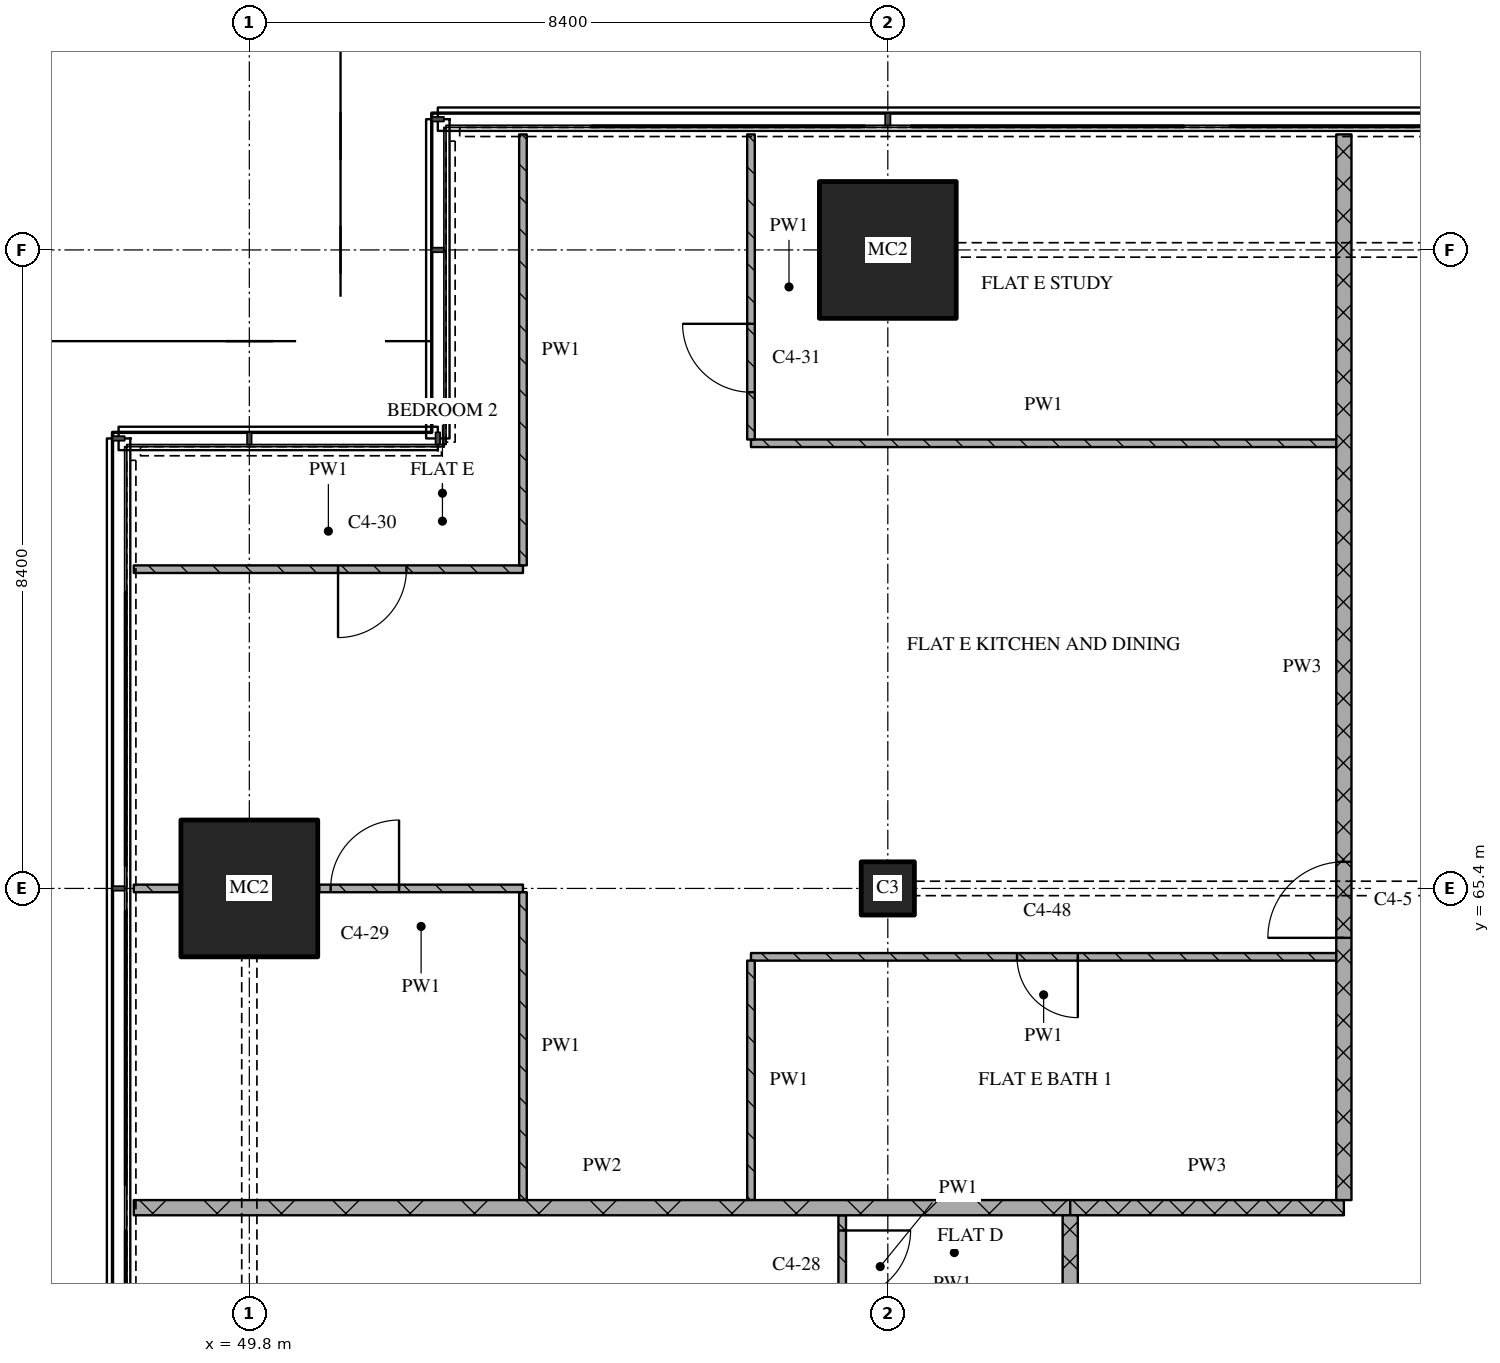
"""IFC4 building model, lengths in metres.
Left out: names, types, materials, properties, quantities, classifications, styles, units other than length and angle.
Written with IfcOpenShell. Run it as: python <this file> out.ifc"""

import sys

from ifc_helpers import new_model, si_unit, direction, frame, frame_2d, origin, origin_2d, place, context, subcontext, project, spatial, rectangle, extrude, element, fill, save


model = new_model("IFC4")
c1 = context("Model", 3, precision=1e-05, world=origin(), true_north=direction((0.0, 1.0)))
c2 = subcontext(c1, "Body", "Model", "MODEL_VIEW")
j1 = project(units=[si_unit("LENGTHUNIT", "METRE"), si_unit("PLANEANGLEUNIT", "RADIAN")], contexts=[c1])
p1 = place(None, origin())
s1 = spatial("IfcSite", under=j1, at=p1, CompositionType="ELEMENT")
p2 = place(p1, origin())
s2 = spatial("IfcBuilding", under=s1, at=p2, CompositionType="ELEMENT")
p3 = place(p2, frame((0.0, 0.0, 179.85)))
s3 = spatial("IfcBuildingStorey", under=s2, at=p3, CompositionType="ELEMENT", Elevation=179.85)
p4 = place(p3, frame((49.8, 65.4, 0.0), z_axis=(0.0, 0.0, 1.0), x_axis=(1.0, 0.0, 0.0)))
e1 = element("IfcColumn", 1, at=p4, inside=s3, PredefinedType="COLUMN", context=c2, shape_type="SweptSolid", body=[
    extrude(rectangle(XDim=1.8, YDim=1.8, at=origin_2d()), origin(), (0.0, 0.0, 1.0), 3.6),
])
p5 = place(p3, frame((58.2, 65.4, 0.0), z_axis=(0.0, 0.0, 1.0), x_axis=(1.0, 0.0, 0.0)))
e2 = element("IfcColumn", 2, at=p5, inside=s3, PredefinedType="COLUMN", context=c2, shape_type="SweptSolid", body=[
    extrude(rectangle(XDim=0.7, YDim=0.7, at=origin_2d()), origin(), (0.0, 0.0, 1.0), 3.6),
])
p6 = place(p3, frame((58.2, 73.8, 0.0), z_axis=(0.0, 0.0, 1.0), x_axis=(1.0, 0.0, 0.0)))
e3 = element("IfcColumn", 3, at=p6, inside=s3, PredefinedType="COLUMN", context=c2, shape_type="SweptSolid", body=[
    extrude(rectangle(XDim=1.8, YDim=1.8, at=origin_2d()), origin(), (0.0, 0.0, 1.0), 3.6),
])
p7 = place(p3, frame((60.6, 61.2, 0.0), z_axis=(0.0, 0.0, 1.0), x_axis=(1.0, 0.0, 0.0)))
e4 = element("IfcWall", 4, at=p7, inside=s3, PredefinedType="PARTITIONING", context=c2, shape_type="SweptSolid", body=[
    extrude(rectangle(XDim=3.6, YDim=0.2, at=frame_2d((1.8, 0.0))), origin(), (0.0, 0.0, 1.0), 3.32),
])
p8 = place(p3, frame((48.28, 61.2, 0.0), z_axis=(0.0, 0.0, 1.0), x_axis=(1.0, 0.0, 0.0)))
e5 = element("IfcWall", 5, at=p8, inside=s3, PredefinedType="PARTITIONING", context=c2, shape_type="SweptSolid", body=[
    extrude(rectangle(XDim=12.32, YDim=0.2, at=frame_2d((6.16, 0.0))), origin(), (0.0, 0.0, 1.0), 3.32),
])
p9 = place(p3, frame((64.1, 64.5, 0.0), z_axis=(0.0, 0.0, 1.0), x_axis=(-1.0, 0.0, 0.0)))
e6 = element("IfcWall", 6, at=p9, inside=s3, PredefinedType="PARTITIONING", context=c2, shape_type="SweptSolid", body=[
    extrude(rectangle(XDim=7.7, YDim=0.1, at=frame_2d((3.85, 0.0))), origin(), (0.0, 0.0, 1.0), 3.32),
])
p10 = place(p9, frame((3.4, 0.0, 0.0)))
e7 = element("IfcOpeningElement", 7, at=p10, cuts=e6, PredefinedType="OPENING", context=c2, shape_type="SweptSolid", body=[
    extrude(rectangle(XDim=0.8, YDim=2.1, at=frame_2d((0.4, 1.05))), frame((0.0, 0.06, 0.0), z_axis=(0.0, -1.0, 0.0), x_axis=(1.0, 0.0, 0.0)), (0.0, 0.0, 1.0), 0.12),
])
p11 = place(p3, frame((48.28, 65.4, 0.0), z_axis=(0.0, 0.0, 1.0), x_axis=(1.0, 0.0, 0.0)))
e8 = element("IfcWall", 8, at=p11, inside=s3, PredefinedType="PARTITIONING", context=c2, shape_type="SweptSolid", body=[
    extrude(rectangle(XDim=0.6, YDim=0.1, at=frame_2d((0.3, 0.0))), origin(), (0.0, 0.0, 1.0), 3.32),
])
p12 = place(p3, frame((53.4, 65.4, 0.0), z_axis=(0.0, 0.0, 1.0), x_axis=(-1.0, 0.0, 0.0)))
e9 = element("IfcWall", 9, at=p12, inside=s3, PredefinedType="PARTITIONING", context=c2, shape_type="SweptSolid", body=[
    extrude(rectangle(XDim=2.68, YDim=0.1, at=frame_2d((1.34, 0.0))), origin(), (0.0, 0.0, 1.0), 3.32),
])
p13 = place(p12, frame((1.63, 0.0, 0.0)))
e10 = element("IfcOpeningElement", 10, at=p13, cuts=e9, PredefinedType="OPENING", context=c2, shape_type="SweptSolid", body=[
    extrude(rectangle(XDim=0.9, YDim=2.1, at=frame_2d((0.45, 1.05))), frame((0.0, 0.06, 0.0), z_axis=(0.0, -1.0, 0.0), x_axis=(1.0, 0.0, 0.0)), (0.0, 0.0, 1.0), 0.12),
])
p14 = place(p3, frame((48.28, 69.6, 0.0), z_axis=(0.0, 0.0, 1.0), x_axis=(1.0, 0.0, 0.0)))
e11 = element("IfcWall", 11, at=p14, inside=s3, PredefinedType="PARTITIONING", context=c2, shape_type="SweptSolid", body=[
    extrude(rectangle(XDim=5.12, YDim=0.1, at=frame_2d((2.56, 0.0))), origin(), (0.0, 0.0, 1.0), 3.32),
])
p15 = place(p14, frame((2.687, 0.0, 0.0)))
e12 = element("IfcOpeningElement", 12, at=p15, cuts=e11, PredefinedType="OPENING", context=c2, shape_type="SweptSolid", body=[
    extrude(rectangle(XDim=0.9, YDim=2.1, at=frame_2d((0.45, 1.05))), frame((0.0, 0.06, 0.0), z_axis=(0.0, -1.0, 0.0), x_axis=(1.0, 0.0, 0.0)), (0.0, 0.0, 1.0), 0.12),
])
p16 = place(p3, frame((56.4, 71.256, 0.0), z_axis=(0.0, 0.0, 1.0), x_axis=(1.0, 0.0, 0.0)))
e13 = element("IfcWall", 13, at=p16, inside=s3, PredefinedType="PARTITIONING", context=c2, shape_type="SweptSolid", body=[
    extrude(rectangle(XDim=7.7, YDim=0.1, at=frame_2d((3.85, 0.0))), origin(), (0.0, 0.0, 1.0), 3.32),
])
p17 = place(p3, frame((53.4, 65.35, 0.0), z_axis=(0.0, 0.0, 1.0), x_axis=(0.0, -1.0, 0.0)))
e14 = element("IfcWall", 14, at=p17, inside=s3, PredefinedType="PARTITIONING", context=c2, shape_type="SweptSolid", body=[
    extrude(rectangle(XDim=4.05, YDim=0.1, at=frame_2d((2.025, 0.0))), origin(), (0.0, 0.0, 1.0), 3.32),
])
p18 = place(p3, frame((53.4, 75.32, 0.0), z_axis=(0.0, 0.0, 1.0), x_axis=(0.0, -1.0, 0.0)))
e15 = element("IfcWall", 15, at=p18, inside=s3, PredefinedType="PARTITIONING", context=c2, shape_type="SweptSolid", body=[
    extrude(rectangle(XDim=5.67, YDim=0.1, at=frame_2d((2.835, 0.0))), origin(), (0.0, 0.0, 1.0), 3.32),
])
p19 = place(p3, frame((56.4, 64.45, 0.0), z_axis=(0.0, 0.0, 1.0), x_axis=(0.0, -1.0, 0.0)))
e16 = element("IfcWall", 16, at=p19, inside=s3, PredefinedType="PARTITIONING", context=c2, shape_type="SweptSolid", body=[
    extrude(rectangle(XDim=3.15, YDim=0.1, at=frame_2d((1.575, 0.0))), origin(), (0.0, 0.0, 1.0), 3.32),
])
p20 = place(p3, frame((56.4, 75.32, 0.0), z_axis=(0.0, 0.0, 1.0), x_axis=(0.0, -1.0, 0.0)))
e17 = element("IfcWall", 17, at=p20, inside=s3, PredefinedType="PARTITIONING", context=c2, shape_type="SweptSolid", body=[
    extrude(rectangle(XDim=4.014, YDim=0.1, at=frame_2d((2.007, 0.0))), origin(), (0.0, 0.0, 1.0), 3.32),
])
p21 = place(p20, frame((2.492, 0.0, 0.0)))
e18 = element("IfcOpeningElement", 18, at=p21, cuts=e17, PredefinedType="OPENING", context=c2, shape_type="SweptSolid", body=[
    extrude(rectangle(XDim=0.9, YDim=2.1, at=frame_2d((0.45, 1.05))), frame((0.0, 0.06, 0.0), z_axis=(0.0, -1.0, 0.0), x_axis=(1.0, 0.0, 0.0)), (0.0, 0.0, 1.0), 0.12),
])
p22 = place(p3, frame((57.6, 61.1, 0.0), z_axis=(0.0, 0.0, 1.0), x_axis=(0.0, -1.0, 0.0)))
e19 = element("IfcWall", 19, at=p22, inside=s3, PredefinedType="PARTITIONING", context=c2, shape_type="SweptSolid", body=[
    extrude(rectangle(XDim=1.35, YDim=0.1, at=frame_2d((0.675, 0.0))), origin(), (0.0, 0.0, 1.0), 3.32),
])
p23 = place(p22, frame((0.2, 0.0, 0.0)))
e20 = element("IfcOpeningElement", 20, at=p23, cuts=e19, PredefinedType="OPENING", context=c2, shape_type="SweptSolid", body=[
    extrude(rectangle(XDim=0.9, YDim=2.1, at=frame_2d((0.45, 1.05))), frame((0.0, 0.06, 0.0), z_axis=(0.0, -1.0, 0.0), x_axis=(1.0, 0.0, 0.0)), (0.0, 0.0, 1.0), 0.12),
])
p24 = place(p3, frame((60.6, 43.3, 0.0), z_axis=(0.0, 0.0, 1.0), x_axis=(0.0, 1.0, 0.0)))
e21 = element("IfcWall", 21, at=p24, inside=s3, PredefinedType="PARTITIONING", context=c2, shape_type="SweptSolid", body=[
    extrude(rectangle(XDim=17.8, YDim=0.2, at=frame_2d((8.9, 0.0))), origin(), (0.0, 0.0, 1.0), 3.32),
])
p25 = place(p24, frame((7.65, 0.0, 0.0)))
e22 = element("IfcOpeningElement", 22, at=p25, cuts=e21, PredefinedType="OPENING", context=c2, shape_type="SweptSolid", body=[
    extrude(rectangle(XDim=1.0, YDim=2.1, at=frame_2d((0.5, 1.05))), frame((0.0, 0.11, 0.0), z_axis=(0.0, -1.0, 0.0), x_axis=(1.0, 0.0, 0.0)), (0.0, 0.0, 1.0), 0.22),
])
p26 = place(p3, frame((64.2, 61.3, 0.0), z_axis=(0.0, 0.0, 1.0), x_axis=(0.0, 1.0, 0.0)))
e23 = element("IfcWall", 23, at=p26, inside=s3, PredefinedType="PARTITIONING", context=c2, shape_type="SweptSolid", body=[
    extrude(rectangle(XDim=14.02, YDim=0.2, at=frame_2d((7.01, 0.0))), origin(), (0.0, 0.0, 1.0), 3.32),
])
p27 = place(p26, frame((3.45, 0.0, 0.0)))
e24 = element("IfcOpeningElement", 24, at=p27, cuts=e23, PredefinedType="OPENING", context=c2, shape_type="SweptSolid", body=[
    extrude(rectangle(XDim=1.0, YDim=2.1, at=frame_2d((0.5, 1.05))), frame((0.0, 0.11, 0.0), z_axis=(0.0, -1.0, 0.0), x_axis=(1.0, 0.0, 0.0)), (0.0, 0.0, 1.0), 0.22),
])
p28 = place(p10, origin())
e25 = element("IfcDoor", 25, at=p28, inside=s3, OperationType="SINGLE_SWING_LEFT", PredefinedType="DOOR", context=c2, shape_type="SweptSolid", body=[
    extrude(rectangle(XDim=0.8, YDim=2.1, at=frame_2d((0.4, 1.05))), frame((0.0, 0.025, 0.0), z_axis=(0.0, -1.0, 0.0), x_axis=(1.0, 0.0, 0.0)), (0.0, 0.0, 1.0), 0.05),
])
fill(e7, e25)
p29 = place(p13, origin())
e26 = element("IfcDoor", 26, at=p29, inside=s3, OperationType="SINGLE_SWING_RIGHT", PredefinedType="DOOR", context=c2, shape_type="SweptSolid", body=[
    extrude(rectangle(XDim=0.9, YDim=2.1, at=frame_2d((0.45, 1.05))), frame((0.0, 0.025, 0.0), z_axis=(0.0, -1.0, 0.0), x_axis=(1.0, 0.0, 0.0)), (0.0, 0.0, 1.0), 0.05),
])
fill(e10, e26)
p30 = place(p15, origin())
e27 = element("IfcDoor", 27, at=p30, inside=s3, OperationType="SINGLE_SWING_RIGHT", PredefinedType="DOOR", context=c2, shape_type="SweptSolid", body=[
    extrude(rectangle(XDim=0.9, YDim=2.1, at=frame_2d((0.45, 1.05))), frame((0.0, 0.025, 0.0), z_axis=(0.0, -1.0, 0.0), x_axis=(1.0, 0.0, 0.0)), (0.0, 0.0, 1.0), 0.05),
])
fill(e12, e27)
p31 = place(p21, origin())
e28 = element("IfcDoor", 28, at=p31, inside=s3, OperationType="SINGLE_SWING_RIGHT", PredefinedType="DOOR", context=c2, shape_type="SweptSolid", body=[
    extrude(rectangle(XDim=0.9, YDim=2.1, at=frame_2d((0.45, 1.05))), frame((0.0, 0.025, 0.0), z_axis=(0.0, -1.0, 0.0), x_axis=(1.0, 0.0, 0.0)), (0.0, 0.0, 1.0), 0.05),
])
fill(e18, e28)
p32 = place(p23, origin())
e29 = element("IfcDoor", 29, at=p32, inside=s3, OperationType="SINGLE_SWING_LEFT", PredefinedType="DOOR", context=c2, shape_type="SweptSolid", body=[
    extrude(rectangle(XDim=0.9, YDim=2.1, at=frame_2d((0.45, 1.05))), frame((0.0, 0.025, 0.0), z_axis=(0.0, -1.0, 0.0), x_axis=(1.0, 0.0, 0.0)), (0.0, 0.0, 1.0), 0.05),
])
fill(e20, e29)
p33 = place(p27, origin())
e30 = element("IfcDoor", 30, at=p33, inside=s3, OperationType="SINGLE_SWING_LEFT", PredefinedType="DOOR", context=c2, shape_type="SweptSolid", body=[
    extrude(rectangle(XDim=1.0, YDim=2.1, at=frame_2d((0.5, 1.05))), frame((0.0, 0.025, 0.0), z_axis=(0.0, -1.0, 0.0), x_axis=(1.0, 0.0, 0.0)), (0.0, 0.0, 1.0), 0.05),
])
fill(e24, e30)
save(model, sys.argv[1])
